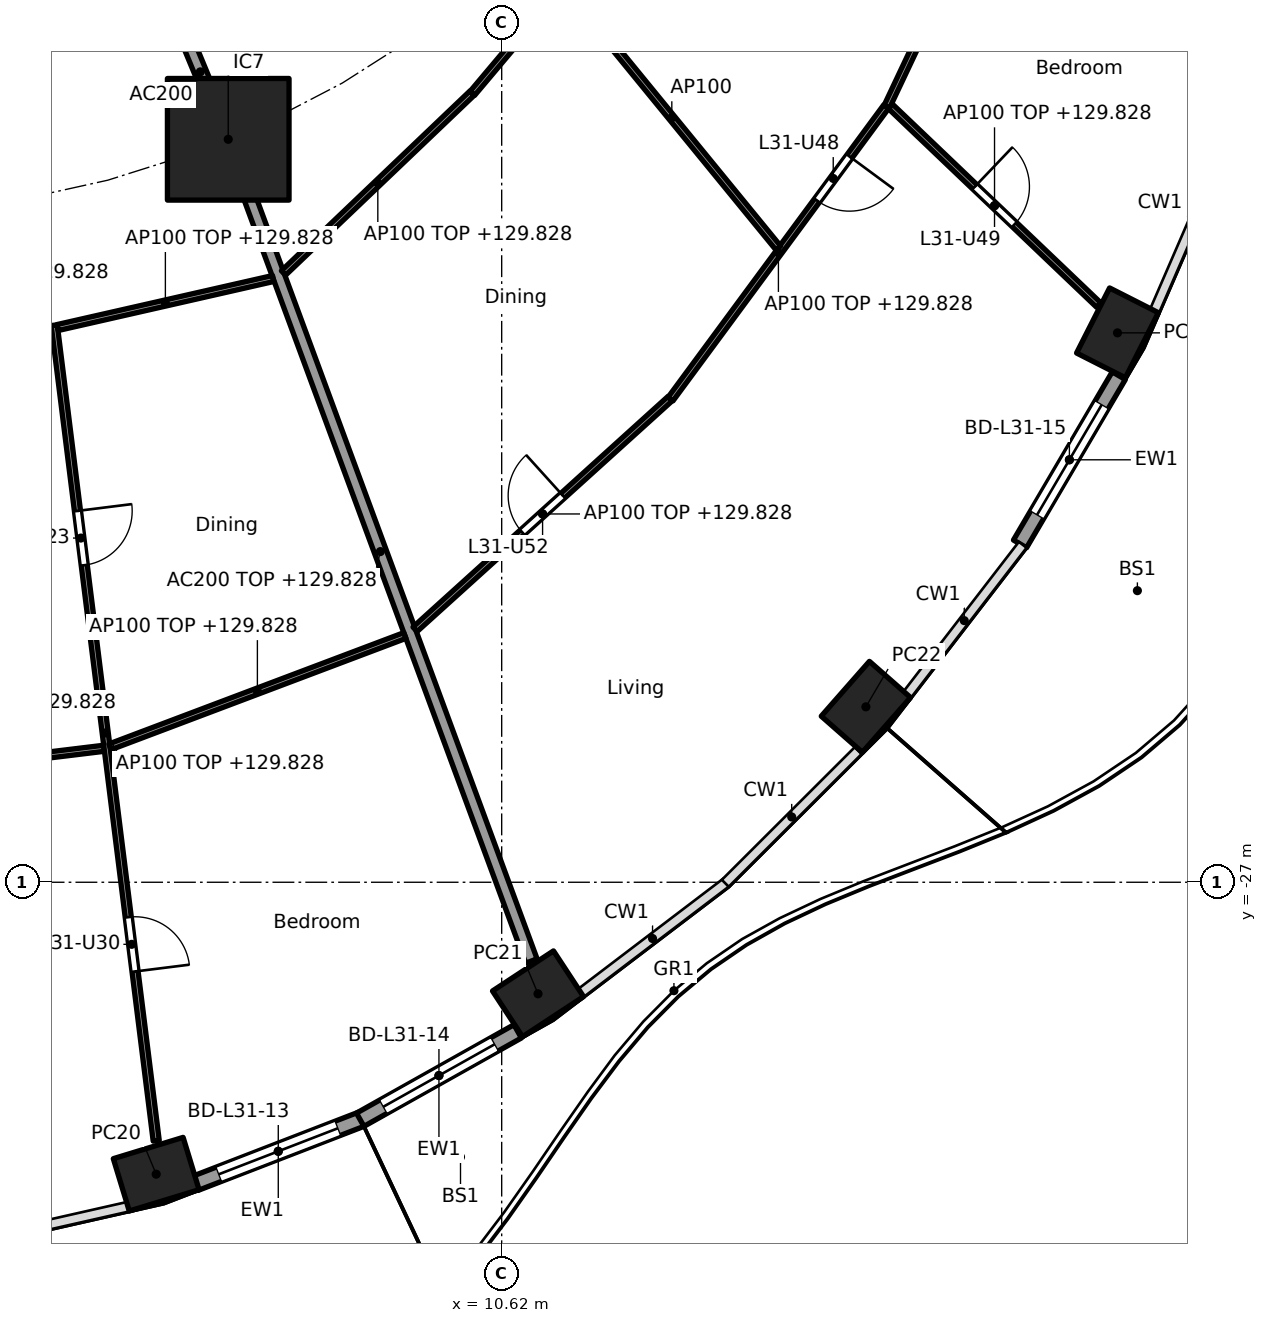
"""IFC4 building model, lengths in metres.
Left out: names, types, materials, properties, quantities, classifications, styles, units other than length and angle.
Written with IfcOpenShell. Run it as: python <this file> out.ifc"""

import sys

from ifc_helpers import new_model, si_unit, direction, frame, frame_2d, origin, origin_2d, place, context, subcontext, project, spatial, rectangle, hollow_rectangle, extrude, element, fill, save


model = new_model("IFC4")
c1 = context("Model", 3, precision=1e-05, world=origin(), true_north=direction((0.0, 1.0)))
c2 = subcontext(c1, "Body", "Model", "MODEL_VIEW")
j1 = project(units=[si_unit("LENGTHUNIT", "METRE"), si_unit("PLANEANGLEUNIT", "RADIAN")], contexts=[c1])
p1 = place(None, origin())
s1 = spatial("IfcSite", under=j1, at=p1, CompositionType="ELEMENT")
p2 = place(p1, origin())
s2 = spatial("IfcBuilding", under=s1, at=p2, CompositionType="ELEMENT")
p3 = place(p2, frame((0.0, 0.0, 127.0)))
s3 = spatial("IfcBuildingStorey", under=s2, at=p3, CompositionType="ELEMENT", Elevation=127.0)
for number, where, z_axis, x_axis in (
    (1, (4.938, -31.801, 0.0), (0.0, 0.0, 1.0), (0.957, 0.292, 0.0)),
    (2, (11.218, -28.834, 0.0), (0.0, 0.0, 1.0), (0.836, 0.549, 0.0)),
    (3, (16.61, -24.115, 0.0), (0.0, 0.0, 1.0), (0.66, 0.751, 0.0)),
    (4, (20.747, -17.965, 0.0), (0.0, 0.0, 1.0), (0.452, 0.892, 0.0)),
):
    element("IfcColumn", number, at=place(p3, frame(where, z_axis=z_axis, x_axis=x_axis)), inside=s3, PredefinedType="COLUMN", context=c2, shape_type="SweptSolid", body=[
        extrude(hollow_rectangle(XDim=1.2, YDim=0.9, WallThickness=0.04, at=origin_2d()), origin(), (0.0, 0.0, 1.0), 3.7),
    ])
p4 = place(p3, frame((6.123, -14.782, 0.0), z_axis=(0.0, 0.0, 1.0), x_axis=(1.0, 0.0, 0.0)))
e5 = element("IfcColumn", 5, at=p4, inside=s3, PredefinedType="COLUMN", context=c2, shape_type="SweptSolid", body=[
    extrude(rectangle(XDim=2.0, YDim=2.0, at=origin_2d()), origin(), (0.0, 0.0, 1.0), 3.7),
])
p5 = place(p3, frame((8.31, -30.898, 0.0), z_axis=(0.0, 0.0, 1.0), x_axis=(-0.932845344347, -0.360277064952, 0.0)))
e6 = element("IfcWall", 6, at=p5, inside=s3, PredefinedType="SOLIDWALL", context=c2, shape_type="SweptSolid", body=[
    extrude(rectangle(XDim=2.923, YDim=0.25, at=frame_2d((1.462, 0.0))), origin(), (0.0, 0.0, 1.0), 3.44),
])
p6 = place(p5, frame((0.412, 0.0, 0.0)))
e7 = element("IfcOpeningElement", 7, at=p6, cuts=e6, PredefinedType="OPENING", context=c2, shape_type="SweptSolid", body=[
    extrude(rectangle(XDim=2.1, YDim=2.4, at=frame_2d((1.05, 1.2))), frame((0.0, 0.135, 0.0), z_axis=(0.0, -1.0, 0.0), x_axis=(1.0, 0.0, 0.0)), (0.0, 0.0, 1.0), 0.27),
])
p7 = place(p3, frame((10.883, -29.452, 0.0), z_axis=(0.0, 0.0, 1.0), x_axis=(-0.87206688547, -0.489386705241, 0.0)))
e8 = element("IfcWall", 8, at=p7, inside=s3, PredefinedType="SOLIDWALL", context=c2, shape_type="SweptSolid", body=[
    extrude(rectangle(XDim=2.97, YDim=0.25, at=frame_2d((1.485, 0.0))), origin(), (0.0, 0.0, 1.0), 3.44),
])
p8 = place(p7, frame((0.435, 0.0, 0.0)))
e9 = element("IfcOpeningElement", 9, at=p8, cuts=e8, PredefinedType="OPENING", context=c2, shape_type="SweptSolid", body=[
    extrude(rectangle(XDim=2.1, YDim=2.4, at=frame_2d((1.05, 1.2))), frame((0.0, 0.135, 0.0), z_axis=(0.0, -1.0, 0.0), x_axis=(1.0, 0.0, 0.0)), (0.0, 0.0, 1.0), 0.27),
])
p9 = place(p3, frame((20.768, -18.669, 0.0), z_axis=(0.0, 0.0, 1.0), x_axis=(-0.506314982873, -0.862348617508, 0.0)))
e10 = element("IfcWall", 10, at=p9, inside=s3, PredefinedType="SOLIDWALL", context=c2, shape_type="SweptSolid", body=[
    extrude(rectangle(XDim=3.208, YDim=0.25, at=frame_2d((1.604, 0.0))), origin(), (0.0, 0.0, 1.0), 3.44),
])
p10 = place(p9, frame((0.554, 0.0, 0.0)))
e11 = element("IfcOpeningElement", 11, at=p10, cuts=e10, PredefinedType="OPENING", context=c2, shape_type="SweptSolid", body=[
    extrude(rectangle(XDim=2.1, YDim=2.4, at=frame_2d((1.05, 1.2))), frame((0.0, 0.135, 0.0), z_axis=(0.0, -1.0, 0.0), x_axis=(1.0, 0.0, 0.0)), (0.0, 0.0, 1.0), 0.27),
])
p11 = place(p3, frame((5.243, -12.657, 0.0), z_axis=(0.0, 0.0, 1.0), x_axis=(0.38273085373, -0.923859888513, 0.0)))
e12 = element("IfcWall", 12, at=p11, inside=s3, PredefinedType="PARTITIONING", context=c2, shape_type="SweptSolid", body=[
    extrude(rectangle(XDim=2.199, YDim=0.2, at=frame_2d((1.1, 0.0))), origin(), (0.0, 0.0, 1.0), 3.44),
])
p12 = place(p3, frame((6.14, -14.829, 0.0), z_axis=(0.0, 0.0, 1.0), x_axis=(0.346169582481, -0.938171956608, 0.0)))
e13 = element("IfcWall", 13, at=p12, inside=s3, PredefinedType="PARTITIONING", context=c2, shape_type="SweptSolid", body=[
    extrude(rectangle(XDim=14.354, YDim=0.2, at=frame_2d((7.177, 0.0))), origin(), (0.0, 0.0, 1.0), 2.828),
])
p13 = place(p3, frame((-1.066, -25.422, 0.0), z_axis=(0.0, 0.0, 1.0), x_axis=(0.992692993044, 0.120667400577, 0.0)))
e14 = element("IfcWall", 14, at=p13, inside=s3, PredefinedType="PARTITIONING", context=c2, shape_type="SweptSolid", body=[
    extrude(rectangle(XDim=5.186, YDim=0.1, at=frame_2d((2.593, 0.0))), origin(), (0.0, 0.0, 1.0), 2.828),
])
p14 = place(p3, frame((3.262, -17.839, 0.0), z_axis=(0.0, 0.0, 1.0), x_axis=(0.124074750982, -0.992272873845, 0.0)))
e15 = element("IfcWall", 15, at=p14, inside=s3, PredefinedType="PARTITIONING", context=c2, shape_type="SweptSolid", body=[
    extrude(rectangle(XDim=13.516, YDim=0.1, at=frame_2d((6.758, 0.0))), origin(), (0.0, 0.0, 1.0), 2.828),
])
p15 = place(p14, frame((3.078, 0.0, 0.0)))
e16 = element("IfcOpeningElement", 16, at=p15, cuts=e15, PredefinedType="OPENING", context=c2, shape_type="SweptSolid", body=[
    extrude(rectangle(XDim=0.9, YDim=2.1, at=frame_2d((0.45, 1.05))), frame((0.0, 0.06, 0.0), z_axis=(0.0, -1.0, 0.0), x_axis=(1.0, 0.0, 0.0)), (0.0, 0.0, 1.0), 0.12),
])
p16 = place(p14, frame((9.811, 0.0, 0.0)))
e17 = element("IfcOpeningElement", 17, at=p16, cuts=e15, PredefinedType="OPENING", context=c2, shape_type="SweptSolid", body=[
    extrude(rectangle(XDim=0.9, YDim=2.1, at=frame_2d((0.45, 1.05))), frame((0.0, 0.06, 0.0), z_axis=(0.0, -1.0, 0.0), x_axis=(1.0, 0.0, 0.0)), (0.0, 0.0, 1.0), 0.12),
])
p17 = place(p3, frame((3.317, -17.878, 0.0), z_axis=(0.0, 0.0, 1.0), x_axis=(0.975095905288, 0.221783623135, 0.0)))
e18 = element("IfcWall", 18, at=p17, inside=s3, PredefinedType="PARTITIONING", context=c2, shape_type="SweptSolid", body=[
    extrude(rectangle(XDim=3.636, YDim=0.1, at=frame_2d((1.818, 0.0))), origin(), (0.0, 0.0, 1.0), 2.828),
])
p18 = place(p3, frame((4.178, -24.773, 0.0), z_axis=(0.0, 0.0, 1.0), x_axis=(0.935583811437, 0.353104703702, 0.0)))
e19 = element("IfcWall", 19, at=p18, inside=s3, PredefinedType="PARTITIONING", context=c2, shape_type="SweptSolid", body=[
    extrude(rectangle(XDim=5.184, YDim=0.1, at=frame_2d((2.592, 0.0))), origin(), (0.0, 0.0, 1.0), 2.828),
])
p19 = place(p3, frame((7.032, -16.98, 0.0), z_axis=(0.0, 0.0, 1.0), x_axis=(0.723709759148, 0.690104473622, 0.0)))
e20 = element("IfcWall", 20, at=p19, inside=s3, PredefinedType="PARTITIONING", context=c2, shape_type="SweptSolid", body=[
    extrude(rectangle(XDim=4.286, YDim=0.1, at=frame_2d((2.143, 0.0))), origin(), (0.0, 0.0, 1.0), 2.828),
])
p20 = place(p3, frame((9.195, -22.84, 0.0), z_axis=(0.0, 0.0, 1.0), x_axis=(0.741675855479, 0.670758470241, 0.0)))
e21 = element("IfcWall", 21, at=p20, inside=s3, PredefinedType="PARTITIONING", context=c2, shape_type="SweptSolid", body=[
    extrude(rectangle(XDim=5.656, YDim=0.1, at=frame_2d((2.828, 0.0))), origin(), (0.0, 0.0, 1.0), 2.828),
])
p21 = place(p20, frame((2.378, 0.0, 0.0)))
e22 = element("IfcOpeningElement", 22, at=p21, cuts=e21, PredefinedType="OPENING", context=c2, shape_type="SweptSolid", body=[
    extrude(rectangle(XDim=0.9, YDim=2.1, at=frame_2d((0.45, 1.05))), frame((0.0, 0.06, 0.0), z_axis=(0.0, -1.0, 0.0), x_axis=(1.0, 0.0, 0.0)), (0.0, 0.0, 1.0), 0.12),
])
p22 = place(p3, frame((10.138, -14.026, 0.0), z_axis=(0.0, 0.0, 1.0), x_axis=(0.644051444483, 0.764982180746, 0.0)))
e23 = element("IfcWall", 23, at=p22, inside=s3, PredefinedType="PARTITIONING", context=c2, shape_type="SweptSolid", body=[
    extrude(rectangle(XDim=4.548, YDim=0.1, at=frame_2d((2.274, 0.0))), origin(), (0.0, 0.0, 1.0), 2.828),
])
p23 = place(p22, frame((2.986, 0.0, 0.0)))
e24 = element("IfcOpeningElement", 24, at=p23, cuts=e23, PredefinedType="OPENING", context=c2, shape_type="SweptSolid", body=[
    extrude(rectangle(XDim=0.9, YDim=2.1, at=frame_2d((0.45, 1.05))), frame((0.0, 0.06, 0.0), z_axis=(0.0, -1.0, 0.0), x_axis=(1.0, 0.0, 0.0)), (0.0, 0.0, 1.0), 0.12),
])
p24 = place(p3, frame((13.397, -19.053, 0.0), z_axis=(0.0, 0.0, 1.0), x_axis=(0.593522299069, 0.804817544856, 0.0)))
e25 = element("IfcWall", 25, at=p24, inside=s3, PredefinedType="PARTITIONING", context=c2, shape_type="SweptSolid", body=[
    extrude(rectangle(XDim=5.976, YDim=0.1, at=frame_2d((2.988, 0.0))), origin(), (0.0, 0.0, 1.0), 2.828),
])
p25 = place(p24, frame((4.057, 0.0, 0.0)))
e26 = element("IfcOpeningElement", 26, at=p25, cuts=e25, PredefinedType="OPENING", context=c2, shape_type="SweptSolid", body=[
    extrude(rectangle(XDim=0.9, YDim=2.1, at=frame_2d((0.45, 1.05))), frame((0.0, 0.06, 0.0), z_axis=(0.0, -1.0, 0.0), x_axis=(1.0, 0.0, 0.0)), (0.0, 0.0, 1.0), 0.12),
])
p26 = place(p3, frame((11.667, -12.287, 0.0), z_axis=(0.0, 0.0, 1.0), x_axis=(0.633038312428, -0.774120465431, 0.0)))
e27 = element("IfcWall", 27, at=p26, inside=s3, PredefinedType="PARTITIONING", context=c2, shape_type="SweptSolid", body=[
    extrude(rectangle(XDim=5.532, YDim=0.1, at=frame_2d((2.766, 0.0))), origin(), (0.0, 0.0, 1.0), 3.44),
])
p27 = place(p3, frame((17.01, -14.238, 0.0), z_axis=(0.0, 0.0, 1.0), x_axis=(0.723650186498, -0.690166941821, 0.0)))
e28 = element("IfcWall", 28, at=p27, inside=s3, PredefinedType="PARTITIONING", context=c2, shape_type="SweptSolid", body=[
    extrude(rectangle(XDim=4.74, YDim=0.1, at=frame_2d((2.37, 0.0))), origin(), (0.0, 0.0, 1.0), 2.828),
])
p28 = place(p27, frame((1.92, 0.0, 0.0)))
e29 = element("IfcOpeningElement", 29, at=p28, cuts=e28, PredefinedType="OPENING", context=c2, shape_type="SweptSolid", body=[
    extrude(rectangle(XDim=0.9, YDim=2.1, at=frame_2d((0.45, 1.05))), frame((0.0, 0.06, 0.0), z_axis=(0.0, -1.0, 0.0), x_axis=(1.0, 0.0, 0.0)), (0.0, 0.0, 1.0), 0.12),
])
p29 = place(p3, frame((16.953, -14.249, 0.0), z_axis=(0.0, 0.0, 1.0), x_axis=(0.427456178439, 0.904036069808, 0.0)))
e30 = element("IfcWall", 30, at=p29, inside=s3, PredefinedType="PARTITIONING", context=c2, shape_type="SweptSolid", body=[
    extrude(rectangle(XDim=6.113, YDim=0.1, at=frame_2d((3.057, 0.0))), origin(), (0.0, 0.0, 1.0), 2.828),
])
p30 = place(p6, origin())
e31 = element("IfcDoor", 31, at=p30, inside=s3, OperationType="SLIDING_TO_LEFT", PredefinedType="DOOR", context=c2, shape_type="SweptSolid", body=[
    extrude(rectangle(XDim=2.1, YDim=2.4, at=frame_2d((1.05, 1.2))), frame((0.0, 0.025, 0.0), z_axis=(0.0, -1.0, 0.0), x_axis=(1.0, 0.0, 0.0)), (0.0, 0.0, 1.0), 0.05),
])
fill(e7, e31)
p31 = place(p8, origin())
e32 = element("IfcDoor", 32, at=p31, inside=s3, OperationType="SLIDING_TO_LEFT", PredefinedType="DOOR", context=c2, shape_type="SweptSolid", body=[
    extrude(rectangle(XDim=2.1, YDim=2.4, at=frame_2d((1.05, 1.2))), frame((0.0, 0.025, 0.0), z_axis=(0.0, -1.0, 0.0), x_axis=(1.0, 0.0, 0.0)), (0.0, 0.0, 1.0), 0.05),
])
fill(e9, e32)
p32 = place(p10, origin())
e33 = element("IfcDoor", 33, at=p32, inside=s3, OperationType="SLIDING_TO_LEFT", PredefinedType="DOOR", context=c2, shape_type="SweptSolid", body=[
    extrude(rectangle(XDim=2.1, YDim=2.4, at=frame_2d((1.05, 1.2))), frame((0.0, 0.025, 0.0), z_axis=(0.0, -1.0, 0.0), x_axis=(1.0, 0.0, 0.0)), (0.0, 0.0, 1.0), 0.05),
])
fill(e11, e33)
p33 = place(p15, origin())
e34 = element("IfcDoor", 34, at=p33, inside=s3, OperationType="SINGLE_SWING_LEFT", PredefinedType="DOOR", context=c2, shape_type="SweptSolid", body=[
    extrude(rectangle(XDim=0.9, YDim=2.1, at=frame_2d((0.45, 1.05))), frame((0.0, 0.025, 0.0), z_axis=(0.0, -1.0, 0.0), x_axis=(1.0, 0.0, 0.0)), (0.0, 0.0, 1.0), 0.05),
])
fill(e16, e34)
p34 = place(p16, origin())
e35 = element("IfcDoor", 35, at=p34, inside=s3, OperationType="SINGLE_SWING_RIGHT", PredefinedType="DOOR", context=c2, shape_type="SweptSolid", body=[
    extrude(rectangle(XDim=0.9, YDim=2.1, at=frame_2d((0.45, 1.05))), frame((0.0, 0.025, 0.0), z_axis=(0.0, -1.0, 0.0), x_axis=(1.0, 0.0, 0.0)), (0.0, 0.0, 1.0), 0.05),
])
fill(e17, e35)
p35 = place(p25, frame((0.9, 0.0, 0.0), x_axis=(-1.0, 0.0, 0.0)))
e36 = element("IfcDoor", 36, at=p35, inside=s3, OperationType="SINGLE_SWING_LEFT", PredefinedType="DOOR", context=c2, shape_type="SweptSolid", body=[
    extrude(rectangle(XDim=0.9, YDim=2.1, at=frame_2d((0.45, 1.05))), frame((0.0, 0.025, 0.0), z_axis=(0.0, -1.0, 0.0), x_axis=(1.0, 0.0, 0.0)), (0.0, 0.0, 1.0), 0.05),
])
fill(e26, e36)
p36 = place(p28, origin())
e37 = element("IfcDoor", 37, at=p36, inside=s3, OperationType="SINGLE_SWING_LEFT", PredefinedType="DOOR", context=c2, shape_type="SweptSolid", body=[
    extrude(rectangle(XDim=0.9, YDim=2.1, at=frame_2d((0.45, 1.05))), frame((0.0, 0.025, 0.0), z_axis=(0.0, -1.0, 0.0), x_axis=(1.0, 0.0, 0.0)), (0.0, 0.0, 1.0), 0.05),
])
fill(e29, e37)
p37 = place(p21, origin())
e38 = element("IfcDoor", 38, at=p37, inside=s3, OperationType="SINGLE_SWING_RIGHT", PredefinedType="DOOR", context=c2, shape_type="SweptSolid", body=[
    extrude(rectangle(XDim=0.9, YDim=2.1, at=frame_2d((0.45, 1.05))), frame((0.0, 0.025, 0.0), z_axis=(0.0, -1.0, 0.0), x_axis=(1.0, 0.0, 0.0)), (0.0, 0.0, 1.0), 0.05),
])
fill(e22, e38)
save(model, sys.argv[1])
